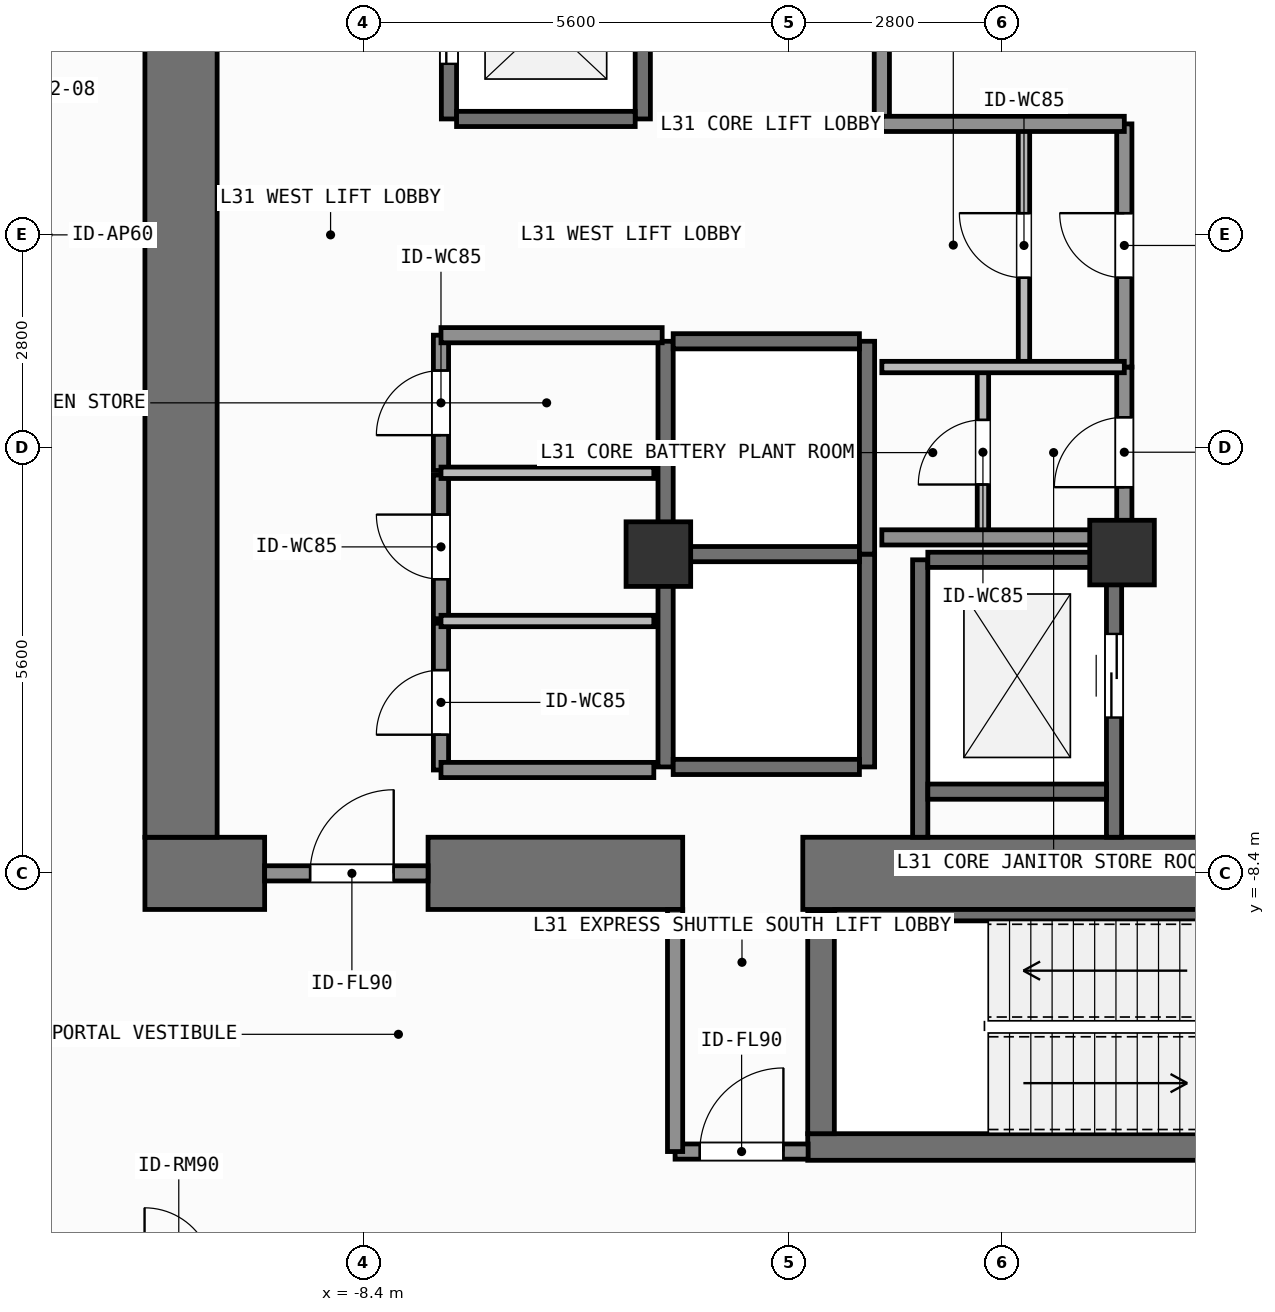
"""IFC4 building model, lengths in metres.
Left out: names, types, materials, properties, quantities, classifications, styles, units other than length and angle.
Written with IfcOpenShell. Run it as: python <this file> out.ifc"""

import sys

from ifc_helpers import new_model, si_unit, direction, frame, frame_2d, origin, origin_2d, place, context, subcontext, project, spatial, rectangle, extrude, element, fill, save


model = new_model("IFC4")
c1 = context("Model", 3, precision=1e-05, world=origin(), true_north=direction((0.0, 1.0)))
c2 = subcontext(c1, "Body", "Model", "MODEL_VIEW")
j1 = project(units=[si_unit("LENGTHUNIT", "METRE"), si_unit("PLANEANGLEUNIT", "RADIAN")], contexts=[c1])
p1 = place(None, origin())
s1 = spatial("IfcSite", under=j1, at=p1, CompositionType="ELEMENT")
p2 = place(p1, origin())
s2 = spatial("IfcBuilding", under=s1, at=p2, CompositionType="ELEMENT")
p3 = place(p2, frame((0.0, 0.0, 125.1)))
s3 = spatial("IfcBuildingStorey", under=s2, at=p3, CompositionType="ELEMENT", Elevation=125.1)
p4 = place(p3, frame((-11.275, -8.4, 0.0), z_axis=(0.0, 0.0, 1.0), x_axis=(1.0, 0.0, 0.0)))
e1 = element("IfcWall", 1, at=p4, inside=s3, PredefinedType="SHEAR", context=c2, shape_type="SweptSolid", body=[
    extrude(rectangle(XDim=1.575, YDim=0.95, at=frame_2d((0.788, 0.0))), origin(), (0.0, 0.0, 1.0), 3.9),
])
p5 = place(p3, frame((-7.55, -8.4, 0.0), z_axis=(0.0, 0.0, 1.0), x_axis=(1.0, 0.0, 0.0)))
e2 = element("IfcWall", 2, at=p5, inside=s3, PredefinedType="SHEAR", context=c2, shape_type="SweptSolid", body=[
    extrude(rectangle(XDim=3.35, YDim=0.95, at=frame_2d((1.675, 0.0))), origin(), (0.0, 0.0, 1.0), 3.9),
])
p6 = place(p3, frame((-2.62, -8.4, 0.0), z_axis=(0.0, 0.0, 1.0), x_axis=(1.0, 0.0, 0.0)))
e3 = element("IfcWall", 3, at=p6, inside=s3, PredefinedType="SHEAR", context=c2, shape_type="SweptSolid", body=[
    extrude(rectangle(XDim=7.27, YDim=0.95, at=frame_2d((3.635, 0.0))), origin(), (0.0, 0.0, 1.0), 3.9),
])
p7 = place(p3, frame((-10.8, -7.925, 0.0), z_axis=(0.0, 0.0, 1.0), x_axis=(0.0, 1.0, 0.0)))
e4 = element("IfcWall", 4, at=p7, inside=s3, PredefinedType="SHEAR", context=c2, shape_type="SweptSolid", body=[
    extrude(rectangle(XDim=15.85, YDim=0.95, at=frame_2d((7.925, 0.0))), origin(), (0.0, 0.0, 1.0), 3.9),
])
p8 = place(p3, frame((-2.555, -12.0, 0.0), z_axis=(0.0, 0.0, 1.0), x_axis=(1.0, 0.0, 0.0)))
e5 = element("IfcWall", 5, at=p8, inside=s3, PredefinedType="SHEAR", context=c2, shape_type="SweptSolid", body=[
    extrude(rectangle(XDim=7.31, YDim=0.35, at=frame_2d((3.655, 0.0))), origin(), (0.0, 0.0, 1.0), 3.9),
])
p9 = place(p3, frame((-2.2, -8.95, 0.0), z_axis=(0.0, 0.0, 1.0), x_axis=(1.0, 0.0, 0.0)))
e6 = element("IfcWall", 6, at=p9, inside=s3, PredefinedType="SHEAR", context=c2, shape_type="SweptSolid", body=[
    extrude(rectangle(XDim=6.6, YDim=0.15, at=frame_2d((3.3, 0.0))), origin(), (0.0, 0.0, 1.0), 3.9),
])
p10 = place(p3, frame((-2.38, -11.825, 0.0), z_axis=(0.0, 0.0, 1.0), x_axis=(0.0, 1.0, 0.0)))
e7 = element("IfcWall", 7, at=p10, inside=s3, PredefinedType="SHEAR", context=c2, shape_type="SweptSolid", body=[
    extrude(rectangle(XDim=2.925, YDim=0.35, at=frame_2d((1.462, 0.0))), origin(), (0.0, 0.0, 1.0), 3.9),
])
for number, where, z_axis, x_axis in (
    (8, (-4.52, -4.2, 0.0), (0.0, 0.0, 1.0), (1.0, 0.0, 0.0)),
    (9, (1.58, -4.18, 0.0), (0.0, 0.0, 1.0), (1.0, 0.0, 0.0)),
):
    element("IfcColumn", number, at=place(p3, frame(where, z_axis=z_axis, x_axis=x_axis)), inside=s3, PredefinedType="COLUMN", context=c2, shape_type="SweptSolid", body=[
        extrude(rectangle(XDim=0.85, YDim=0.85, at=origin_2d()), origin(), (0.0, 0.0, 1.0), 3.9),
    ])
p11 = place(p3, frame((-7.275, 1.525, 0.0), z_axis=(0.0, 0.0, 1.0), x_axis=(0.0, 1.0, 0.0)))
e10 = element("IfcWall", 10, at=p11, inside=s3, PredefinedType="SHEAR", context=c2, shape_type="SweptSolid", body=[
    extrude(rectangle(XDim=2.55, YDim=0.2, at=frame_2d((1.275, 0.0))), origin(), (0.0, 0.0, 1.0), 3.68),
])
p12 = place(p11, frame((0.725, 0.0, 0.0)))
e11 = element("IfcOpeningElement", 11, at=p12, cuts=e10, PredefinedType="OPENING", context=c2, shape_type="SweptSolid", body=[
    extrude(rectangle(XDim=1.1, YDim=2.2, at=frame_2d((0.55, 1.1))), frame((0.0, 0.11, 0.0), z_axis=(0.0, -1.0, 0.0), x_axis=(1.0, 0.0, 0.0)), (0.0, 0.0, 1.0), 0.22),
])
p13 = place(p3, frame((-4.725, 1.525, 0.0), z_axis=(0.0, 0.0, 1.0), x_axis=(0.0, 1.0, 0.0)))
e12 = element("IfcWall", 12, at=p13, inside=s3, PredefinedType="SHEAR", context=c2, shape_type="SweptSolid", body=[
    extrude(rectangle(XDim=2.55, YDim=0.2, at=frame_2d((1.275, 0.0))), origin(), (0.0, 0.0, 1.0), 3.68),
])
p14 = place(p3, frame((-7.175, 1.525, 0.0), z_axis=(0.0, 0.0, 1.0), x_axis=(1.0, 0.0, 0.0)))
e13 = element("IfcWall", 13, at=p14, inside=s3, PredefinedType="SHEAR", context=c2, shape_type="SweptSolid", body=[
    extrude(rectangle(XDim=2.35, YDim=0.2, at=frame_2d((1.175, 0.0))), origin(), (0.0, 0.0, 1.0), 3.68),
])
for number, where, z_axis, x_axis in (
    (14, (-4.425, -7.0, 0.0), (0.0, 0.0, 1.0), (0.0, 1.0, 0.0)),
    (15, (-1.775, -7.0, 0.0), (0.0, 0.0, 1.0), (0.0, 1.0, 0.0)),
):
    element("IfcWall", number, at=place(p3, frame(where, z_axis=z_axis, x_axis=x_axis)), inside=s3, PredefinedType="SHEAR", context=c2, shape_type="SweptSolid", body=[
        extrude(rectangle(XDim=2.8, YDim=0.2, at=frame_2d((1.4, 0.0))), origin(), (0.0, 0.0, 1.0), 3.68),
    ])
for number, where, z_axis, x_axis in (
    (16, (-4.325, -7.0, 0.0), (0.0, 0.0, 1.0), (1.0, 0.0, 0.0)),
    (17, (-4.325, -4.2, 0.0), (0.0, 0.0, 1.0), (1.0, 0.0, 0.0)),
):
    element("IfcWall", number, at=place(p3, frame(where, z_axis=z_axis, x_axis=x_axis)), inside=s3, PredefinedType="SHEAR", context=c2, shape_type="SweptSolid", body=[
        extrude(rectangle(XDim=2.45, YDim=0.2, at=frame_2d((1.225, 0.0))), origin(), (0.0, 0.0, 1.0), 3.68),
    ])
for number, where, z_axis, x_axis in (
    (18, (-4.425, -4.2, 0.0), (0.0, 0.0, 1.0), (0.0, 1.0, 0.0)),
    (19, (-1.775, -4.2, 0.0), (0.0, 0.0, 1.0), (0.0, 1.0, 0.0)),
):
    element("IfcWall", number, at=place(p3, frame(where, z_axis=z_axis, x_axis=x_axis)), inside=s3, PredefinedType="SHEAR", context=c2, shape_type="SweptSolid", body=[
        extrude(rectangle(XDim=2.8, YDim=0.2, at=frame_2d((1.4, 0.0))), origin(), (0.0, 0.0, 1.0), 3.68),
    ])
p15 = place(p3, frame((-4.325, -1.4, 0.0), z_axis=(0.0, 0.0, 1.0), x_axis=(1.0, 0.0, 0.0)))
e20 = element("IfcWall", 20, at=p15, inside=s3, PredefinedType="SHEAR", context=c2, shape_type="SweptSolid", body=[
    extrude(rectangle(XDim=2.45, YDim=0.2, at=frame_2d((1.225, 0.0))), origin(), (0.0, 0.0, 1.0), 3.68),
])
p16 = place(p3, frame((-1.075, -7.925, 0.0), z_axis=(0.0, 0.0, 1.0), x_axis=(0.0, 1.0, 0.0)))
e21 = element("IfcWall", 21, at=p16, inside=s3, PredefinedType="SHEAR", context=c2, shape_type="SweptSolid", body=[
    extrude(rectangle(XDim=3.65, YDim=0.2, at=frame_2d((1.825, 0.0))), origin(), (0.0, 0.0, 1.0), 3.68),
])
p17 = place(p3, frame((1.475, -7.925, 0.0), z_axis=(0.0, 0.0, 1.0), x_axis=(0.0, 1.0, 0.0)))
e22 = element("IfcWall", 22, at=p17, inside=s3, PredefinedType="SHEAR", context=c2, shape_type="SweptSolid", body=[
    extrude(rectangle(XDim=3.65, YDim=0.2, at=frame_2d((1.825, 0.0))), origin(), (0.0, 0.0, 1.0), 3.68),
])
p18 = place(p17, frame((1.575, 0.0, 0.0)))
e23 = element("IfcOpeningElement", 23, at=p18, cuts=e22, PredefinedType="OPENING", context=c2, shape_type="SweptSolid", body=[
    extrude(rectangle(XDim=1.1, YDim=2.2, at=frame_2d((0.55, 1.1))), frame((0.0, 0.11, 0.0), z_axis=(0.0, -1.0, 0.0), x_axis=(1.0, 0.0, 0.0)), (0.0, 0.0, 1.0), 0.22),
])
for number, where, z_axis, x_axis in (
    (24, (-0.975, -7.325, 0.0), (0.0, 0.0, 1.0), (1.0, 0.0, 0.0)),
    (25, (-0.975, -4.275, 0.0), (0.0, 0.0, 1.0), (1.0, 0.0, 0.0)),
):
    element("IfcWall", number, at=place(p3, frame(where, z_axis=z_axis, x_axis=x_axis)), inside=s3, PredefinedType="SHEAR", context=c2, shape_type="SweptSolid", body=[
        extrude(rectangle(XDim=2.35, YDim=0.2, at=frame_2d((1.175, 0.0))), origin(), (0.0, 0.0, 1.0), 3.68),
    ])
p19 = place(p3, frame((-9.7, -8.4, 0.0), z_axis=(0.0, 0.0, 1.0), x_axis=(1.0, 0.0, 0.0)))
e26 = element("IfcWall", 26, at=p19, inside=s3, PredefinedType="SOLIDWALL", context=c2, shape_type="SweptSolid", body=[
    extrude(rectangle(XDim=2.15, YDim=0.2, at=frame_2d((1.075, 0.0))), origin(), (0.0, 0.0, 1.0), 2.72),
])
p20 = place(p19, frame((0.598, 0.0, 0.0)))
e27 = element("IfcOpeningElement", 27, at=p20, cuts=e26, PredefinedType="OPENING", context=c2, shape_type="SweptSolid", body=[
    extrude(rectangle(XDim=1.1, YDim=2.15, at=frame_2d((0.55, 1.075))), frame((0.0, 0.11, 0.0), z_axis=(0.0, -1.0, 0.0), x_axis=(1.0, 0.0, 0.0)), (0.0, 0.0, 1.0), 0.22),
])
p21 = place(p3, frame((-4.3, -12.06, 0.0), z_axis=(0.0, 0.0, 1.0), x_axis=(1.0, 0.0, 0.0)))
e28 = element("IfcWall", 28, at=p21, inside=s3, PredefinedType="SOLIDWALL", context=c2, shape_type="SweptSolid", body=[
    extrude(rectangle(XDim=1.75, YDim=0.2, at=frame_2d((0.875, 0.0))), origin(), (0.0, 0.0, 1.0), 3.68),
])
p22 = place(p21, frame((0.325, 0.0, 0.0)))
e29 = element("IfcOpeningElement", 29, at=p22, cuts=e28, PredefinedType="OPENING", context=c2, shape_type="SweptSolid", body=[
    extrude(rectangle(XDim=1.1, YDim=2.15, at=frame_2d((0.55, 1.075))), frame((0.0, 0.11, 0.0), z_axis=(0.0, -1.0, 0.0), x_axis=(1.0, 0.0, 0.0)), (0.0, 0.0, 1.0), 0.22),
])
p23 = place(p3, frame((-0.25, -3.98, 0.0), z_axis=(0.0, 0.0, 1.0), x_axis=(0.0, 1.0, 0.0)))
e30 = element("IfcWall", 30, at=p23, inside=s3, PredefinedType="PARTITIONING", context=c2, shape_type="SweptSolid", body=[
    extrude(rectangle(XDim=2.241, YDim=0.15, at=frame_2d((1.121, 0.0))), origin(), (0.0, 0.0, 1.0), 3.68),
])
p24 = place(p23, frame((0.696, 0.0, 0.0)))
e31 = element("IfcOpeningElement", 31, at=p24, cuts=e30, PredefinedType="OPENING", context=c2, shape_type="SweptSolid", body=[
    extrude(rectangle(XDim=0.85, YDim=2.1, at=frame_2d((0.425, 1.05))), frame((0.0, 0.085, 0.0), z_axis=(0.0, -1.0, 0.0), x_axis=(1.0, 0.0, 0.0)), (0.0, 0.0, 1.0), 0.17),
])
p25 = place(p3, frame((0.29, -1.739, 0.0), z_axis=(0.0, 0.0, 1.0), x_axis=(0.0, 1.0, 0.0)))
e32 = element("IfcWall", 32, at=p25, inside=s3, PredefinedType="PARTITIONING", context=c2, shape_type="SweptSolid", body=[
    extrude(rectangle(XDim=3.199, YDim=0.15, at=frame_2d((1.6, 0.0))), origin(), (0.0, 0.0, 1.0), 3.68),
])
p26 = place(p25, frame((1.175, 0.0, 0.0)))
e33 = element("IfcOpeningElement", 33, at=p26, cuts=e32, PredefinedType="OPENING", context=c2, shape_type="SweptSolid", body=[
    extrude(rectangle(XDim=0.85, YDim=2.1, at=frame_2d((0.425, 1.05))), frame((0.0, 0.085, 0.0), z_axis=(0.0, -1.0, 0.0), x_axis=(1.0, 0.0, 0.0)), (0.0, 0.0, 1.0), 0.17),
])
p27 = place(p3, frame((1.61, -3.98, 0.0), z_axis=(0.0, 0.0, 1.0), x_axis=(0.0, 1.0, 0.0)))
e34 = element("IfcWall", 34, at=p27, inside=s3, PredefinedType="SOLIDWALL", context=c2, shape_type="SweptSolid", body=[
    extrude(rectangle(XDim=2.241, YDim=0.2, at=frame_2d((1.121, 0.0))), origin(), (0.0, 0.0, 1.0), 3.68),
])
p28 = place(p27, frame((0.66, 0.0, 0.0)))
e35 = element("IfcOpeningElement", 35, at=p28, cuts=e34, PredefinedType="OPENING", context=c2, shape_type="SweptSolid", body=[
    extrude(rectangle(XDim=0.92, YDim=2.1, at=frame_2d((0.46, 1.05))), frame((0.0, 0.11, 0.0), z_axis=(0.0, -1.0, 0.0), x_axis=(1.0, 0.0, 0.0)), (0.0, 0.0, 1.0), 0.22),
])
p29 = place(p3, frame((1.61, -1.739, 0.0), z_axis=(0.0, 0.0, 1.0), x_axis=(0.0, 1.0, 0.0)))
e36 = element("IfcWall", 36, at=p29, inside=s3, PredefinedType="SOLIDWALL", context=c2, shape_type="SweptSolid", body=[
    extrude(rectangle(XDim=3.199, YDim=0.2, at=frame_2d((1.6, 0.0))), origin(), (0.0, 0.0, 1.0), 3.68),
])
p30 = place(p29, frame((1.175, 0.0, 0.0)))
e37 = element("IfcOpeningElement", 37, at=p30, cuts=e36, PredefinedType="OPENING", context=c2, shape_type="SweptSolid", body=[
    extrude(rectangle(XDim=0.85, YDim=2.1, at=frame_2d((0.425, 1.05))), frame((0.0, 0.11, 0.0), z_axis=(0.0, -1.0, 0.0), x_axis=(1.0, 0.0, 0.0)), (0.0, 0.0, 1.0), 0.22),
])
p31 = place(p3, frame((-7.38, -7.04, 0.0), z_axis=(0.0, 0.0, 1.0), x_axis=(0.0, 1.0, 0.0)))
e38 = element("IfcWall", 38, at=p31, inside=s3, PredefinedType="SOLIDWALL", context=c2, shape_type="SweptSolid", body=[
    extrude(rectangle(XDim=1.93, YDim=0.2, at=frame_2d((0.965, 0.0))), origin(), (0.0, 0.0, 1.0), 3.68),
])
p32 = place(p31, frame((0.464, 0.0, 0.0)))
e39 = element("IfcOpeningElement", 39, at=p32, cuts=e38, PredefinedType="OPENING", context=c2, shape_type="SweptSolid", body=[
    extrude(rectangle(XDim=0.85, YDim=2.1, at=frame_2d((0.425, 1.05))), frame((0.0, 0.11, 0.0), z_axis=(0.0, -1.0, 0.0), x_axis=(1.0, 0.0, 0.0)), (0.0, 0.0, 1.0), 0.22),
])
p33 = place(p3, frame((-7.38, -5.05, 0.0), z_axis=(0.0, 0.0, 1.0), x_axis=(0.0, 1.0, 0.0)))
e40 = element("IfcWall", 40, at=p33, inside=s3, PredefinedType="SOLIDWALL", context=c2, shape_type="SweptSolid", body=[
    extrude(rectangle(XDim=1.89, YDim=0.2, at=frame_2d((0.945, 0.0))), origin(), (0.0, 0.0, 1.0), 3.68),
])
p34 = place(p33, frame((0.52, 0.0, 0.0)))
e41 = element("IfcOpeningElement", 41, at=p34, cuts=e40, PredefinedType="OPENING", context=c2, shape_type="SweptSolid", body=[
    extrude(rectangle(XDim=0.85, YDim=2.1, at=frame_2d((0.425, 1.05))), frame((0.0, 0.11, 0.0), z_axis=(0.0, -1.0, 0.0), x_axis=(1.0, 0.0, 0.0)), (0.0, 0.0, 1.0), 0.22),
])
p35 = place(p3, frame((-7.38, -3.1, 0.0), z_axis=(0.0, 0.0, 1.0), x_axis=(0.0, 1.0, 0.0)))
e42 = element("IfcWall", 42, at=p35, inside=s3, PredefinedType="SOLIDWALL", context=c2, shape_type="SweptSolid", body=[
    extrude(rectangle(XDim=1.78, YDim=0.2, at=frame_2d((0.89, 0.0))), origin(), (0.0, 0.0, 1.0), 3.68),
])
p36 = place(p35, frame((0.465, 0.0, 0.0)))
e43 = element("IfcOpeningElement", 43, at=p36, cuts=e42, PredefinedType="OPENING", context=c2, shape_type="SweptSolid", body=[
    extrude(rectangle(XDim=0.85, YDim=2.1, at=frame_2d((0.425, 1.05))), frame((0.0, 0.11, 0.0), z_axis=(0.0, -1.0, 0.0), x_axis=(1.0, 0.0, 0.0)), (0.0, 0.0, 1.0), 0.22),
])
p37 = place(p3, frame((-4.3, -12.06, 0.0), z_axis=(0.0, 0.0, 1.0), x_axis=(0.0, 1.0, 0.0)))
e44 = element("IfcWall", 44, at=p37, inside=s3, PredefinedType="SOLIDWALL", context=c2, shape_type="SweptSolid", body=[
    extrude(rectangle(XDim=3.185, YDim=0.2, at=frame_2d((1.593, 0.0))), origin(), (0.0, 0.0, 1.0), 3.68),
])
p38 = place(p3, frame((-7.38, -1.32, 0.0), z_axis=(0.0, 0.0, 1.0), x_axis=(1.0, 0.0, 0.0)))
e45 = element("IfcWall", 45, at=p38, inside=s3, PredefinedType="SOLIDWALL", context=c2, shape_type="SweptSolid", body=[
    extrude(rectangle(XDim=2.91, YDim=0.2, at=frame_2d((1.455, 0.0))), origin(), (0.0, 0.0, 1.0), 3.68),
])
p39 = place(p3, frame((-1.58, 1.48, 0.0), z_axis=(0.0, 0.0, 1.0), x_axis=(0.0, 1.0, 0.0)))
e46 = element("IfcWall", 46, at=p39, inside=s3, PredefinedType="SOLIDWALL", context=c2, shape_type="SweptSolid", body=[
    extrude(rectangle(XDim=2.7, YDim=0.2, at=frame_2d((1.35, 0.0))), origin(), (0.0, 0.0, 1.0), 3.68),
])
for number, where, z_axis, x_axis in (
    (47, (-1.58, -3.98, 0.0), (0.0, 0.0, 1.0), (1.0, 0.0, 0.0)),
    (48, (-1.58, 1.46, 0.0), (0.0, 0.0, 1.0), (1.0, 0.0, 0.0)),
):
    element("IfcWall", number, at=place(p3, frame(where, z_axis=z_axis, x_axis=x_axis)), inside=s3, PredefinedType="SOLIDWALL", context=c2, shape_type="SweptSolid", body=[
        extrude(rectangle(XDim=3.19, YDim=0.2, at=frame_2d((1.595, 0.0))), origin(), (0.0, 0.0, 1.0), 3.68),
    ])
p40 = place(p3, frame((-1.58, -1.739, 0.0), z_axis=(0.0, 0.0, 1.0), x_axis=(1.0, 0.0, 0.0)))
e49 = element("IfcWall", 49, at=p40, inside=s3, PredefinedType="PARTITIONING", context=c2, shape_type="SweptSolid", body=[
    extrude(rectangle(XDim=3.19, YDim=0.15, at=frame_2d((1.595, 0.0))), origin(), (0.0, 0.0, 1.0), 3.68),
])
p41 = place(p3, frame((-7.38, -7.04, 0.0), z_axis=(0.0, 0.0, 1.0), x_axis=(1.0, 0.0, 0.0)))
e50 = element("IfcWall", 50, at=p41, inside=s3, PredefinedType="SOLIDWALL", context=c2, shape_type="SweptSolid", body=[
    extrude(rectangle(XDim=2.8, YDim=0.2, at=frame_2d((1.4, 0.0))), origin(), (0.0, 0.0, 1.0), 3.68),
])
for number, where, z_axis, x_axis in (
    (51, (-7.38, -5.08, 0.0), (0.0, 0.0, 1.0), (1.0, 0.0, 0.0)),
    (52, (-7.38, -3.13, 0.0), (0.0, 0.0, 1.0), (1.0, 0.0, 0.0)),
):
    element("IfcWall", number, at=place(p3, frame(where, z_axis=z_axis, x_axis=x_axis)), inside=s3, PredefinedType="PARTITIONING", context=c2, shape_type="SweptSolid", body=[
        extrude(rectangle(XDim=2.8, YDim=0.15, at=frame_2d((1.4, 0.0))), origin(), (0.0, 0.0, 1.0), 3.68),
    ])
p42 = place(p12, origin())
e53 = element("IfcDoor", 53, at=p42, inside=s3, OperationType="SLIDING_TO_LEFT", PredefinedType="DOOR", context=c2, shape_type="SweptSolid", body=[
    extrude(rectangle(XDim=1.1, YDim=2.2, at=frame_2d((0.55, 1.1))), frame((0.0, 0.025, 0.0), z_axis=(0.0, -1.0, 0.0), x_axis=(1.0, 0.0, 0.0)), (0.0, 0.0, 1.0), 0.05),
])
fill(e11, e53)
p43 = place(p18, origin())
e54 = element("IfcDoor", 54, at=p43, inside=s3, OperationType="SLIDING_TO_LEFT", PredefinedType="DOOR", context=c2, shape_type="SweptSolid", body=[
    extrude(rectangle(XDim=1.1, YDim=2.2, at=frame_2d((0.55, 1.1))), frame((0.0, 0.025, 0.0), z_axis=(0.0, -1.0, 0.0), x_axis=(1.0, 0.0, 0.0)), (0.0, 0.0, 1.0), 0.05),
])
fill(e23, e54)
p44 = place(p20, origin())
e55 = element("IfcDoor", 55, at=p44, inside=s3, OperationType="SINGLE_SWING_RIGHT", PredefinedType="DOOR", context=c2, shape_type="SweptSolid", body=[
    extrude(rectangle(XDim=1.1, YDim=2.15, at=frame_2d((0.55, 1.075))), frame((0.0, 0.025, 0.0), z_axis=(0.0, -1.0, 0.0), x_axis=(1.0, 0.0, 0.0)), (0.0, 0.0, 1.0), 0.05),
])
fill(e27, e55)
p45 = place(p22, origin())
e56 = element("IfcDoor", 56, at=p45, inside=s3, OperationType="SINGLE_SWING_RIGHT", PredefinedType="DOOR", context=c2, shape_type="SweptSolid", body=[
    extrude(rectangle(XDim=1.1, YDim=2.15, at=frame_2d((0.55, 1.075))), frame((0.0, 0.025, 0.0), z_axis=(0.0, -1.0, 0.0), x_axis=(1.0, 0.0, 0.0)), (0.0, 0.0, 1.0), 0.05),
])
fill(e29, e56)
p46 = place(p24, origin())
e57 = element("IfcDoor", 57, at=p46, inside=s3, OperationType="SINGLE_SWING_LEFT", PredefinedType="DOOR", context=c2, shape_type="SweptSolid", body=[
    extrude(rectangle(XDim=0.85, YDim=2.1, at=frame_2d((0.425, 1.05))), frame((0.0, 0.025, 0.0), z_axis=(0.0, -1.0, 0.0), x_axis=(1.0, 0.0, 0.0)), (0.0, 0.0, 1.0), 0.05),
])
fill(e31, e57)
p47 = place(p26, origin())
e58 = element("IfcDoor", 58, at=p47, inside=s3, OperationType="SINGLE_SWING_RIGHT", PredefinedType="DOOR", context=c2, shape_type="SweptSolid", body=[
    extrude(rectangle(XDim=0.85, YDim=2.1, at=frame_2d((0.425, 1.05))), frame((0.0, 0.025, 0.0), z_axis=(0.0, -1.0, 0.0), x_axis=(1.0, 0.0, 0.0)), (0.0, 0.0, 1.0), 0.05),
])
fill(e33, e58)
p48 = place(p28, origin())
e59 = element("IfcDoor", 59, at=p48, inside=s3, OperationType="SINGLE_SWING_LEFT", PredefinedType="DOOR", context=c2, shape_type="SweptSolid", body=[
    extrude(rectangle(XDim=0.92, YDim=2.1, at=frame_2d((0.46, 1.05))), frame((0.0, 0.025, 0.0), z_axis=(0.0, -1.0, 0.0), x_axis=(1.0, 0.0, 0.0)), (0.0, 0.0, 1.0), 0.05),
])
fill(e35, e59)
p49 = place(p30, origin())
e60 = element("IfcDoor", 60, at=p49, inside=s3, OperationType="SINGLE_SWING_RIGHT", PredefinedType="DOOR", context=c2, shape_type="SweptSolid", body=[
    extrude(rectangle(XDim=0.85, YDim=2.1, at=frame_2d((0.425, 1.05))), frame((0.0, 0.025, 0.0), z_axis=(0.0, -1.0, 0.0), x_axis=(1.0, 0.0, 0.0)), (0.0, 0.0, 1.0), 0.05),
])
fill(e37, e60)
p50 = place(p32, origin())
e61 = element("IfcDoor", 61, at=p50, inside=s3, OperationType="SINGLE_SWING_LEFT", PredefinedType="DOOR", context=c2, shape_type="SweptSolid", body=[
    extrude(rectangle(XDim=0.85, YDim=2.1, at=frame_2d((0.425, 1.05))), frame((0.0, 0.025, 0.0), z_axis=(0.0, -1.0, 0.0), x_axis=(1.0, 0.0, 0.0)), (0.0, 0.0, 1.0), 0.05),
])
fill(e39, e61)
p51 = place(p34, origin())
e62 = element("IfcDoor", 62, at=p51, inside=s3, OperationType="SINGLE_SWING_RIGHT", PredefinedType="DOOR", context=c2, shape_type="SweptSolid", body=[
    extrude(rectangle(XDim=0.85, YDim=2.1, at=frame_2d((0.425, 1.05))), frame((0.0, 0.025, 0.0), z_axis=(0.0, -1.0, 0.0), x_axis=(1.0, 0.0, 0.0)), (0.0, 0.0, 1.0), 0.05),
])
fill(e41, e62)
p52 = place(p36, origin())
e63 = element("IfcDoor", 63, at=p52, inside=s3, OperationType="SINGLE_SWING_LEFT", PredefinedType="DOOR", context=c2, shape_type="SweptSolid", body=[
    extrude(rectangle(XDim=0.85, YDim=2.1, at=frame_2d((0.425, 1.05))), frame((0.0, 0.025, 0.0), z_axis=(0.0, -1.0, 0.0), x_axis=(1.0, 0.0, 0.0)), (0.0, 0.0, 1.0), 0.05),
])
fill(e43, e63)
save(model, sys.argv[1])
